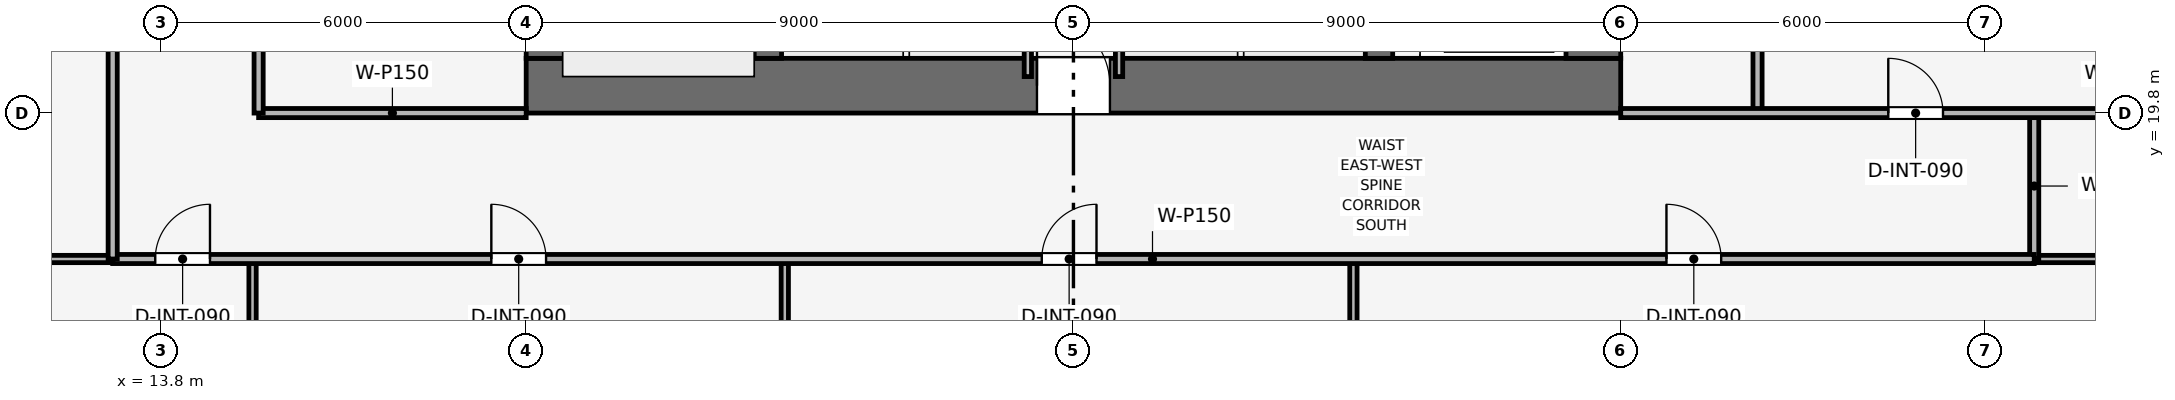
"""IFC4 building model, lengths in metres.
Left out: names, types, materials, properties, quantities, classifications, styles, units other than length and angle.
Written with IfcOpenShell. Run it as: python <this file> out.ifc"""

import sys

from ifc_helpers import new_model, si_unit, direction, frame, frame_2d, origin, place, context, subcontext, project, spatial, rectangle, extrude, element, fill, save


model = new_model("IFC4")
c1 = context("Model", 3, precision=1e-05, world=origin(), true_north=direction((0.0, 1.0)))
c2 = subcontext(c1, "Body", "Model", "MODEL_VIEW")
j1 = project(units=[si_unit("LENGTHUNIT", "METRE"), si_unit("PLANEANGLEUNIT", "RADIAN")], contexts=[c1])
p1 = place(None, origin())
s1 = spatial("IfcSite", under=j1, at=p1, CompositionType="ELEMENT")
p2 = place(p1, origin())
s2 = spatial("IfcBuilding", under=s1, at=p2, CompositionType="ELEMENT")
p3 = place(p2, frame((0.0, 0.0, 187.05)))
s3 = spatial("IfcBuildingStorey", under=s2, at=p3, CompositionType="ELEMENT", Elevation=187.05)
p4 = place(p3, frame((19.8, 20.25, 0.0), z_axis=(0.0, 0.0, 1.0), x_axis=(1.0, 0.0, 0.0)))
e1 = element("IfcWall", 1, at=p4, inside=s3, PredefinedType="SHEAR", context=c2, shape_type="SweptSolid", body=[
    extrude(rectangle(XDim=18.0, YDim=0.9, at=frame_2d((9.0, 0.0))), origin(), (0.0, 0.0, 1.0), 3.75),
])
p5 = place(p4, frame((8.4, 0.0, 0.0)))
e2 = element("IfcOpeningElement", 2, at=p5, cuts=e1, PredefinedType="OPENING", context=c2, shape_type="SweptSolid", body=[
    extrude(rectangle(XDim=1.2, YDim=2.2, at=frame_2d((0.6, 1.1))), frame((0.0, 0.46, 0.0), z_axis=(0.0, -1.0, 0.0), x_axis=(1.0, 0.0, 0.0)), (0.0, 0.0, 1.0), 0.92),
])
p6 = place(p3, frame((20.25, 20.7, 0.0), z_axis=(0.0, 0.0, 1.0), x_axis=(0.0, 1.0, 0.0)))
e3 = element("IfcWall", 3, at=p6, inside=s3, PredefinedType="SHEAR", context=c2, shape_type="SweptSolid", body=[
    extrude(rectangle(XDim=16.2, YDim=0.9, at=frame_2d((8.1, 0.0))), origin(), (0.0, 0.0, 1.0), 3.75),
])
p7 = place(p6, frame((10.1, 0.0, 0.0)))
e4 = element("IfcOpeningElement", 4, at=p7, cuts=e3, PredefinedType="OPENING", context=c2, shape_type="SweptSolid", body=[
    extrude(rectangle(XDim=1.1, YDim=2.15, at=frame_2d((0.55, 1.075))), frame((0.0, 0.46, 0.0), z_axis=(0.0, -1.0, 0.0), x_axis=(1.0, 0.0, 0.0)), (0.0, 0.0, 1.0), 0.92),
])
p8 = place(p3, frame((37.35, 20.7, 0.0), z_axis=(0.0, 0.0, 1.0), x_axis=(0.0, 1.0, 0.0)))
e5 = element("IfcWall", 5, at=p8, inside=s3, PredefinedType="SHEAR", context=c2, shape_type="SweptSolid", body=[
    extrude(rectangle(XDim=16.2, YDim=0.9, at=frame_2d((8.1, 0.0))), origin(), (0.0, 0.0, 1.0), 3.75),
])
p9 = place(p8, frame((4.6, 0.0, 0.0)))
e6 = element("IfcOpeningElement", 6, at=p9, cuts=e5, PredefinedType="OPENING", context=c2, shape_type="SweptSolid", body=[
    extrude(rectangle(XDim=1.1, YDim=2.15, at=frame_2d((0.55, 1.075))), frame((0.0, 0.46, 0.0), z_axis=(0.0, -1.0, 0.0), x_axis=(1.0, 0.0, 0.0)), (0.0, 0.0, 1.0), 0.92),
])
for number, where, z_axis, x_axis in (
    (7, (23.775, 20.7, 0.0), (0.0, 0.0, 1.0), (0.0, 1.0, 0.0)),
    (8, (33.825, 20.7, 0.0), (0.0, 0.0, 1.0), (0.0, 1.0, 0.0)),
):
    element("IfcWall", number, at=place(p3, frame(where, z_axis=z_axis, x_axis=x_axis)), inside=s3, PredefinedType="SHEAR", context=c2, shape_type="SweptSolid", body=[
        extrude(rectangle(XDim=16.2, YDim=0.45, at=frame_2d((8.1, 0.0))), origin(), (0.0, 0.0, 1.0), 3.75),
    ])
for number, where, z_axis, x_axis in (
    (9, (28.05, 20.4, 0.0), (0.0, 0.0, 1.0), (0.0, 1.0, 0.0)),
    (10, (29.55, 20.4, 0.0), (0.0, 0.0, 1.0), (0.0, 1.0, 0.0)),
):
    element("IfcWall", number, at=place(p3, frame(where, z_axis=z_axis, x_axis=x_axis)), inside=s3, PredefinedType="PARTITIONING", context=c2, shape_type="SweptSolid", body=[
        extrude(rectangle(XDim=2.75, YDim=0.12, at=frame_2d((1.375, 0.0))), origin(), (0.0, 0.0, 1.0), 3.495),
    ])
p10 = place(p3, frame((15.4, 19.8, 0.0), z_axis=(0.0, 0.0, 1.0), x_axis=(1.0, 0.0, 0.0)))
e11 = element("IfcWall", 11, at=p10, inside=s3, PredefinedType="PARTITIONING", context=c2, shape_type="SweptSolid", body=[
    extrude(rectangle(XDim=4.4, YDim=0.15, at=frame_2d((2.2, 0.0))), origin(), (0.0, 0.0, 1.0), 3.03),
])
p11 = place(p3, frame((15.4, 19.8, 0.0), z_axis=(0.0, 0.0, 1.0), x_axis=(0.0, 1.0, 0.0)))
e12 = element("IfcWall", 12, at=p11, inside=s3, PredefinedType="PARTITIONING", context=c2, shape_type="SweptSolid", body=[
    extrude(rectangle(XDim=10.35, YDim=0.15, at=frame_2d((5.175, 0.0))), origin(), (0.0, 0.0, 1.0), 3.03),
])
p12 = place(p11, frame((1.2, 0.0, 0.0)))
e13 = element("IfcOpeningElement", 13, at=p12, cuts=e12, PredefinedType="OPENING", context=c2, shape_type="SweptSolid", body=[
    extrude(rectangle(XDim=0.9, YDim=2.1, at=frame_2d((0.45, 1.05))), frame((0.0, 0.085, 0.0), z_axis=(0.0, -1.0, 0.0), x_axis=(1.0, 0.0, 0.0)), (0.0, 0.0, 1.0), 0.17),
])
p13 = place(p11, frame((4.7, 0.0, 0.0)))
e14 = element("IfcOpeningElement", 14, at=p13, cuts=e12, PredefinedType="OPENING", context=c2, shape_type="SweptSolid", body=[
    extrude(rectangle(XDim=0.9, YDim=2.1, at=frame_2d((0.45, 1.05))), frame((0.0, 0.085, 0.0), z_axis=(0.0, -1.0, 0.0), x_axis=(1.0, 0.0, 0.0)), (0.0, 0.0, 1.0), 0.17),
])
p14 = place(p11, frame((8.1, 0.0, 0.0)))
e15 = element("IfcOpeningElement", 15, at=p14, cuts=e12, PredefinedType="OPENING", context=c2, shape_type="SweptSolid", body=[
    extrude(rectangle(XDim=0.95, YDim=2.1, at=frame_2d((0.475, 1.05))), frame((0.0, 0.085, 0.0), z_axis=(0.0, -1.0, 0.0), x_axis=(1.0, 0.0, 0.0)), (0.0, 0.0, 1.0), 0.17),
])
p15 = place(p3, frame((40.05, 19.8, 0.0), z_axis=(0.0, 0.0, 1.0), x_axis=(0.0, 1.0, 0.0)))
e16 = element("IfcWall", 16, at=p15, inside=s3, PredefinedType="PARTITIONING", context=c2, shape_type="SweptSolid", body=[
    extrude(rectangle(XDim=7.05, YDim=0.15, at=frame_2d((3.525, 0.0))), origin(), (0.0, 0.0, 1.0), 3.03),
])
for number, where, z_axis, x_axis in (
    (17, (15.3, 4.63, 0.0), (0.0, 0.0, 1.0), (0.0, 1.0, 0.0)),
    (18, (24.053, 4.63, 0.0), (0.0, 0.0, 1.0), (0.0, 1.0, 0.0)),
    (19, (33.404, 4.63, 0.0), (0.0, 0.0, 1.0), (0.0, 1.0, 0.0)),
):
    element("IfcWall", number, at=place(p3, frame(where, z_axis=z_axis, x_axis=x_axis)), inside=s3, PredefinedType="PARTITIONING", context=c2, shape_type="SweptSolid", body=[
        extrude(rectangle(XDim=12.77, YDim=0.12, at=frame_2d((6.385, 0.0))), origin(), (0.0, 0.0, 1.0), 2.98),
    ])
p16 = place(p3, frame((4.63, 17.4, 0.0), z_axis=(0.0, 0.0, 1.0), x_axis=(1.0, 0.0, 0.0)))
e20 = element("IfcWall", 20, at=p16, inside=s3, PredefinedType="PARTITIONING", context=c2, shape_type="SweptSolid", body=[
    extrude(rectangle(XDim=8.37, YDim=0.12, at=frame_2d((4.185, 0.0))), origin(), (0.0, 0.0, 1.0), 2.98),
])
p17 = place(p3, frame((44.6, 17.4, 0.0), z_axis=(0.0, 0.0, 1.0), x_axis=(1.0, 0.0, 0.0)))
e21 = element("IfcWall", 21, at=p17, inside=s3, PredefinedType="PARTITIONING", context=c2, shape_type="SweptSolid", body=[
    extrude(rectangle(XDim=8.37, YDim=0.12, at=frame_2d((4.185, 0.0))), origin(), (0.0, 0.0, 1.0), 2.98),
])
p18 = place(p3, frame((44.6, 17.4, 0.0), z_axis=(0.0, 0.0, 1.0), x_axis=(0.0, 1.0, 0.0)))
e22 = element("IfcWall", 22, at=p18, inside=s3, PredefinedType="PARTITIONING", context=c2, shape_type="SweptSolid", body=[
    extrude(rectangle(XDim=2.4, YDim=0.15, at=frame_2d((1.2, 0.0))), origin(), (0.0, 0.0, 1.0), 3.495),
])
p19 = place(p3, frame((37.8, 19.8, 0.0), z_axis=(0.0, 0.0, 1.0), x_axis=(1.0, 0.0, 0.0)))
e23 = element("IfcWall", 23, at=p19, inside=s3, PredefinedType="PARTITIONING", context=c2, shape_type="SweptSolid", body=[
    extrude(rectangle(XDim=15.17, YDim=0.15, at=frame_2d((7.585, 0.0))), origin(), (0.0, 0.0, 1.0), 2.98),
])
p20 = place(p19, frame((4.4, 0.0, 0.0)))
e24 = element("IfcOpeningElement", 24, at=p20, cuts=e23, PredefinedType="OPENING", context=c2, shape_type="SweptSolid", body=[
    extrude(rectangle(XDim=0.9, YDim=2.1, at=frame_2d((0.45, 1.05))), frame((0.0, 0.085, 0.0), z_axis=(0.0, -1.0, 0.0), x_axis=(1.0, 0.0, 0.0)), (0.0, 0.0, 1.0), 0.17),
])
p21 = place(p3, frame((13.0, 17.4, 0.0), z_axis=(0.0, 0.0, 1.0), x_axis=(1.0, 0.0, 0.0)))
e25 = element("IfcWall", 25, at=p21, inside=s3, PredefinedType="PARTITIONING", context=c2, shape_type="SweptSolid", body=[
    extrude(rectangle(XDim=31.6, YDim=0.15, at=frame_2d((15.8, 0.0))), origin(), (0.0, 0.0, 1.0), 3.03),
])
p22 = place(p21, frame((0.7, 0.0, 0.0)))
e26 = element("IfcOpeningElement", 26, at=p22, cuts=e25, PredefinedType="OPENING", context=c2, shape_type="SweptSolid", body=[
    extrude(rectangle(XDim=0.9, YDim=2.1, at=frame_2d((0.45, 1.05))), frame((0.0, 0.085, 0.0), z_axis=(0.0, -1.0, 0.0), x_axis=(1.0, 0.0, 0.0)), (0.0, 0.0, 1.0), 0.17),
])
p23 = place(p21, frame((6.227, 0.0, 0.0)))
e27 = element("IfcOpeningElement", 27, at=p23, cuts=e25, PredefinedType="OPENING", context=c2, shape_type="SweptSolid", body=[
    extrude(rectangle(XDim=0.9, YDim=2.1, at=frame_2d((0.45, 1.05))), frame((0.0, 0.085, 0.0), z_axis=(0.0, -1.0, 0.0), x_axis=(1.0, 0.0, 0.0)), (0.0, 0.0, 1.0), 0.17),
])
p24 = place(p21, frame((15.279, 0.0, 0.0)))
e28 = element("IfcOpeningElement", 28, at=p24, cuts=e25, PredefinedType="OPENING", context=c2, shape_type="SweptSolid", body=[
    extrude(rectangle(XDim=0.9, YDim=2.1, at=frame_2d((0.45, 1.05))), frame((0.0, 0.085, 0.0), z_axis=(0.0, -1.0, 0.0), x_axis=(1.0, 0.0, 0.0)), (0.0, 0.0, 1.0), 0.17),
])
p25 = place(p21, frame((25.552, 0.0, 0.0)))
e29 = element("IfcOpeningElement", 29, at=p25, cuts=e25, PredefinedType="OPENING", context=c2, shape_type="SweptSolid", body=[
    extrude(rectangle(XDim=0.9, YDim=2.1, at=frame_2d((0.45, 1.05))), frame((0.0, 0.085, 0.0), z_axis=(0.0, -1.0, 0.0), x_axis=(1.0, 0.0, 0.0)), (0.0, 0.0, 1.0), 0.17),
])
p26 = place(p3, frame((13.0, 17.4, 0.0), z_axis=(0.0, 0.0, 1.0), x_axis=(0.0, 1.0, 0.0)))
e30 = element("IfcWall", 30, at=p26, inside=s3, PredefinedType="PARTITIONING", context=c2, shape_type="SweptSolid", body=[
    extrude(rectangle(XDim=22.8, YDim=0.15, at=frame_2d((11.4, 0.0))), origin(), (0.0, 0.0, 1.0), 3.03),
])
p27 = place(p26, frame((10.95, 0.0, 0.0)))
e31 = element("IfcOpeningElement", 31, at=p27, cuts=e30, PredefinedType="OPENING", context=c2, shape_type="SweptSolid", body=[
    extrude(rectangle(XDim=0.9, YDim=2.1, at=frame_2d((0.45, 1.05))), frame((0.0, 0.085, 0.0), z_axis=(0.0, -1.0, 0.0), x_axis=(1.0, 0.0, 0.0)), (0.0, 0.0, 1.0), 0.17),
])
p28 = place(p20, origin())
e32 = element("IfcDoor", 32, at=p28, inside=s3, OperationType="SINGLE_SWING_LEFT", PredefinedType="DOOR", context=c2, shape_type="SweptSolid", body=[
    extrude(rectangle(XDim=0.9, YDim=2.1, at=frame_2d((0.45, 1.05))), frame((0.0, 0.025, 0.0), z_axis=(0.0, -1.0, 0.0), x_axis=(1.0, 0.0, 0.0)), (0.0, 0.0, 1.0), 0.05),
])
fill(e24, e32)
p29 = place(p22, origin())
e33 = element("IfcDoor", 33, at=p29, inside=s3, OperationType="SINGLE_SWING_RIGHT", PredefinedType="DOOR", context=c2, shape_type="SweptSolid", body=[
    extrude(rectangle(XDim=0.9, YDim=2.1, at=frame_2d((0.45, 1.05))), frame((0.0, 0.025, 0.0), z_axis=(0.0, -1.0, 0.0), x_axis=(1.0, 0.0, 0.0)), (0.0, 0.0, 1.0), 0.05),
])
fill(e26, e33)
p30 = place(p23, origin())
e34 = element("IfcDoor", 34, at=p30, inside=s3, OperationType="SINGLE_SWING_LEFT", PredefinedType="DOOR", context=c2, shape_type="SweptSolid", body=[
    extrude(rectangle(XDim=0.9, YDim=2.1, at=frame_2d((0.45, 1.05))), frame((0.0, 0.025, 0.0), z_axis=(0.0, -1.0, 0.0), x_axis=(1.0, 0.0, 0.0)), (0.0, 0.0, 1.0), 0.05),
])
fill(e27, e34)
p31 = place(p24, origin())
e35 = element("IfcDoor", 35, at=p31, inside=s3, OperationType="SINGLE_SWING_RIGHT", PredefinedType="DOOR", context=c2, shape_type="SweptSolid", body=[
    extrude(rectangle(XDim=0.9, YDim=2.1, at=frame_2d((0.45, 1.05))), frame((0.0, 0.025, 0.0), z_axis=(0.0, -1.0, 0.0), x_axis=(1.0, 0.0, 0.0)), (0.0, 0.0, 1.0), 0.05),
])
fill(e28, e35)
p32 = place(p25, origin())
e36 = element("IfcDoor", 36, at=p32, inside=s3, OperationType="SINGLE_SWING_LEFT", PredefinedType="DOOR", context=c2, shape_type="SweptSolid", body=[
    extrude(rectangle(XDim=0.9, YDim=2.1, at=frame_2d((0.45, 1.05))), frame((0.0, 0.025, 0.0), z_axis=(0.0, -1.0, 0.0), x_axis=(1.0, 0.0, 0.0)), (0.0, 0.0, 1.0), 0.05),
])
fill(e29, e36)
p33 = place(p5, origin())
e37 = element("IfcDoor", 37, at=p33, inside=s3, OperationType="SINGLE_SWING_LEFT", PredefinedType="DOOR", context=c2, shape_type="SweptSolid", body=[
    extrude(rectangle(XDim=1.2, YDim=2.2, at=frame_2d((0.6, 1.1))), frame((0.0, 0.025, 0.0), z_axis=(0.0, -1.0, 0.0), x_axis=(1.0, 0.0, 0.0)), (0.0, 0.0, 1.0), 0.05),
])
fill(e2, e37)
save(model, sys.argv[1])
